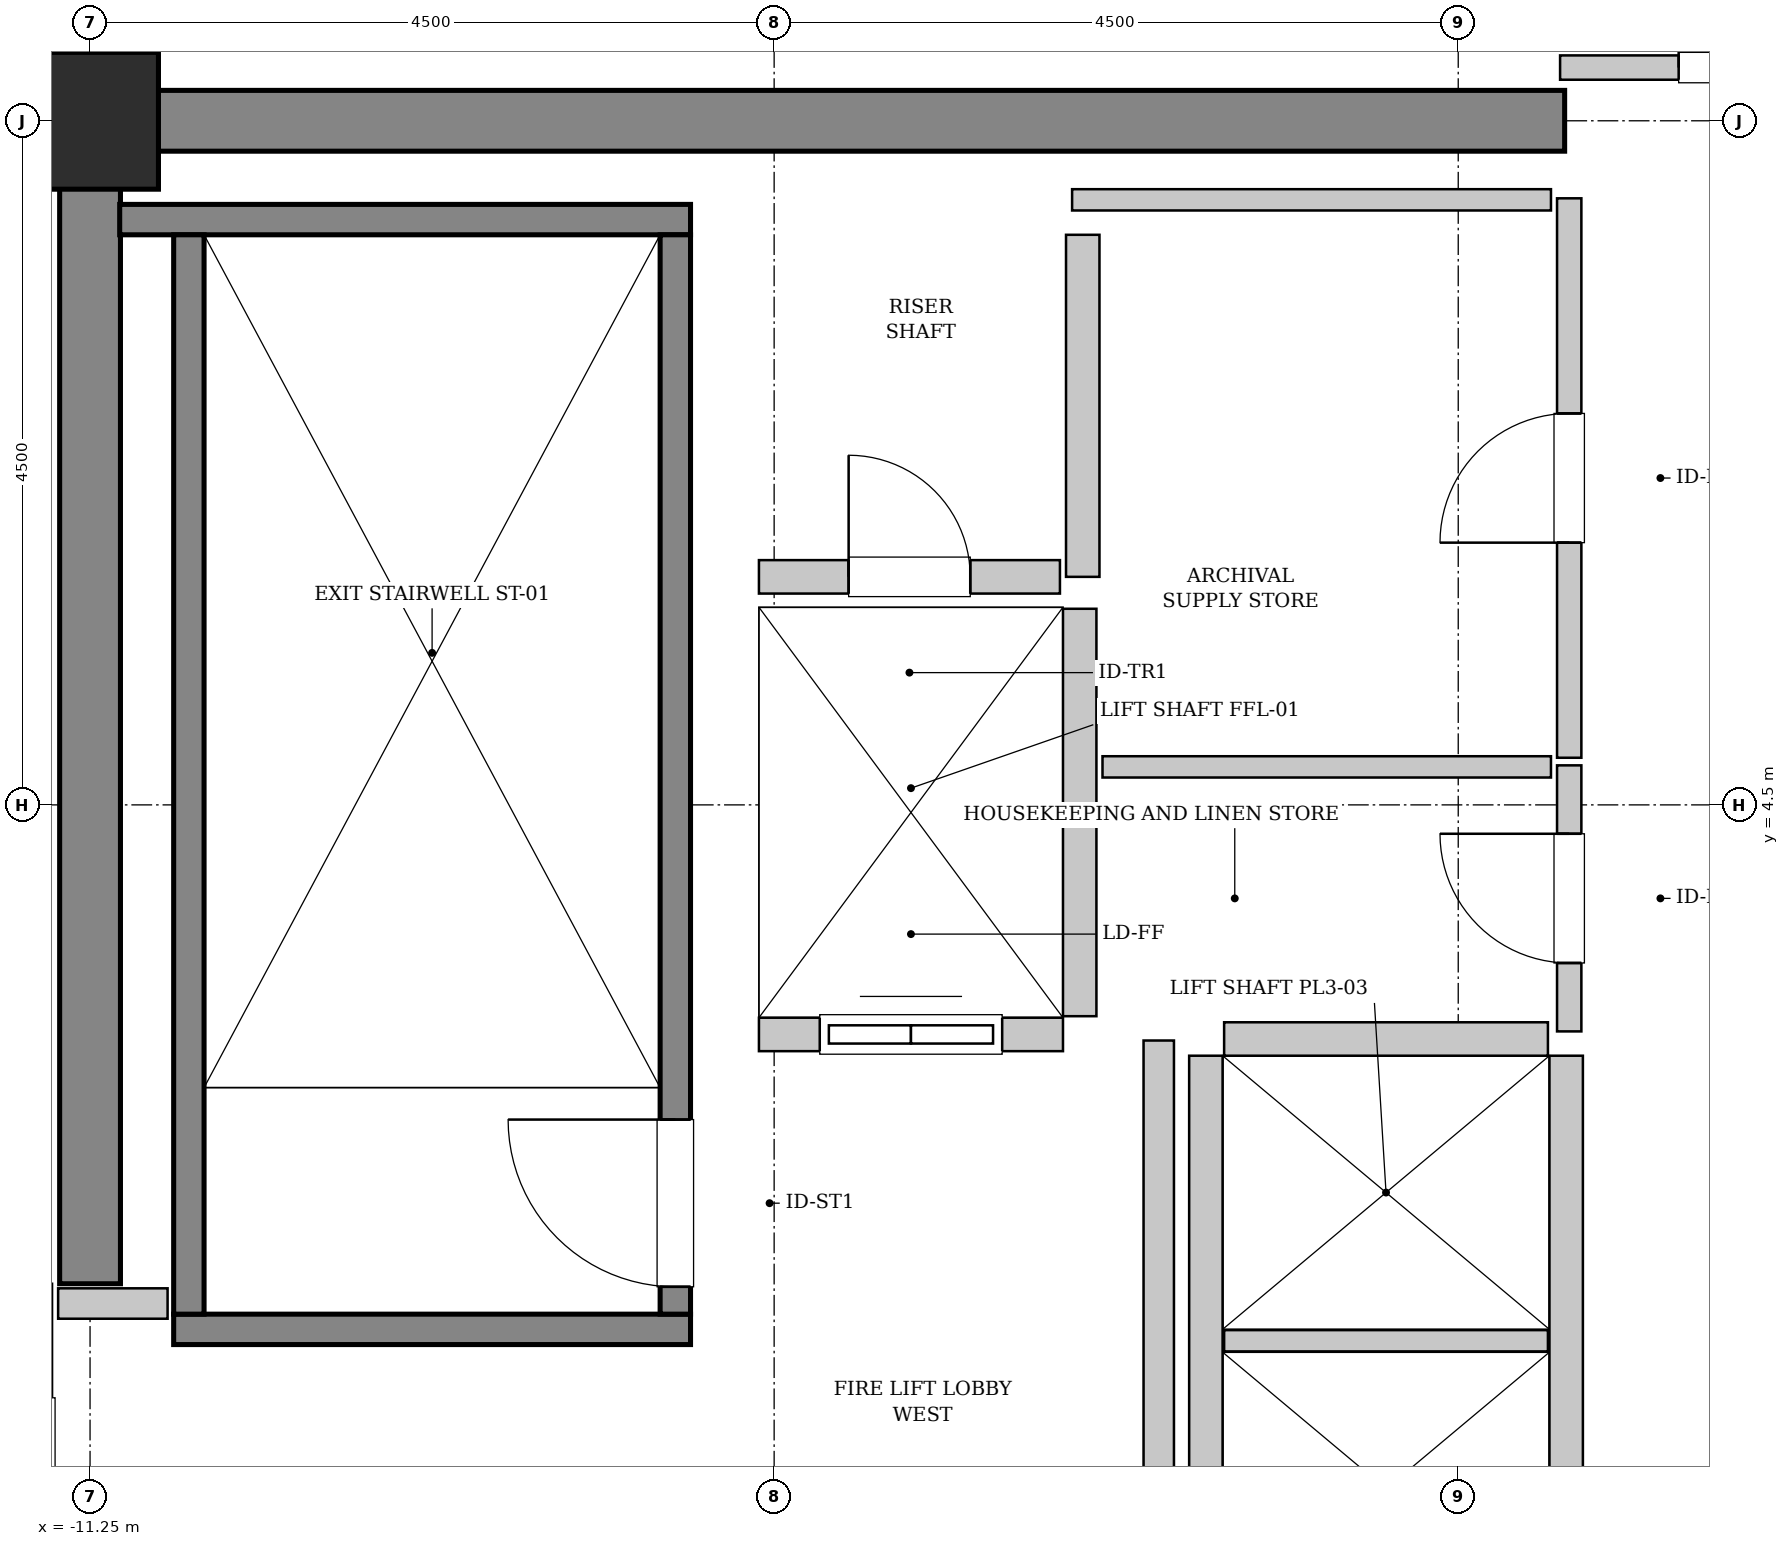
"""IFC4 building model, lengths in metres.
Left out: names, types, materials, properties, quantities, classifications, styles, units other than length and angle.
Written with IfcOpenShell. Run it as: python <this file> out.ifc"""

import sys

from ifc_helpers import new_model, si_unit, direction, frame, frame_2d, origin, origin_2d, place, context, subcontext, project, spatial, rectangle, extrude, source, transform, mapped, element, fill, save


model = new_model("IFC4")
c1 = context("Model", 3, precision=1e-05, world=origin(), true_north=direction((0.0, 1.0)))
c2 = subcontext(c1, "Body", "Model", "MODEL_VIEW")
j1 = project(units=[si_unit("LENGTHUNIT", "METRE"), si_unit("PLANEANGLEUNIT", "RADIAN")], contexts=[c1])
p1 = place(None, origin())
s1 = spatial("IfcSite", under=j1, at=p1, CompositionType="ELEMENT")
p2 = place(p1, origin())
s2 = spatial("IfcBuilding", under=s1, at=p2, CompositionType="ELEMENT")
p3 = place(p2, frame((0.0, 0.0, 349.0)))
s3 = spatial("IfcBuildingStorey", under=s2, at=p3, CompositionType="ELEMENT", Elevation=349.0)
m1 = source(origin(), c2, "Body", "SweptSolid", [
    extrude(rectangle(XDim=9.9, YDim=0.4, at=frame_2d((4.95, 0.0))), origin(), (0.0, 0.0, 1.0), 4.8),
])
p4 = place(p3, frame((-11.45, 9.0, 0.0), z_axis=(0.0, 0.0, 1.0), x_axis=(1.0, 0.0, 0.0)))
e1 = element("IfcWall", 1, at=p4, inside=s3, PredefinedType="SHEAR", context=c2, shape_type="MappedRepresentation", body=[
    mapped(m1, transform((0.0, 0.0, 0.0), x_axis=(1.0, 0.0, 0.0), y_axis=(0.0, 1.0, 0.0), z_axis=(0.0, 0.0, 1.0), scale=1.0)),
])
m2 = source(origin(), c2, "Body", "SweptSolid", [
    extrude(rectangle(XDim=7.45, YDim=0.4, at=frame_2d((3.725, 0.0))), origin(), (0.0, 0.0, 1.0), 4.8),
])
p5 = place(p3, frame((-11.25, 1.35, 0.0), z_axis=(0.0, 0.0, 1.0), x_axis=(0.0, 1.0, 0.0)))
e2 = element("IfcWall", 2, at=p5, inside=s3, PredefinedType="SHEAR", context=c2, shape_type="MappedRepresentation", body=[
    mapped(m2, transform((0.0, 0.0, 0.0), x_axis=(1.0, 0.0, 0.0), y_axis=(0.0, 1.0, 0.0), z_axis=(0.0, 0.0, 1.0), scale=1.0)),
])
m3 = source(origin(), c2, "Body", "SweptSolid", [
    extrude(rectangle(XDim=0.9, YDim=0.9, at=origin_2d()), origin(), (0.0, 0.0, 1.0), 4.8),
])
p6 = place(p3, frame((-11.25, 9.0, 0.0), z_axis=(0.0, 0.0, 1.0), x_axis=(1.0, 0.0, 0.0)))
e3 = element("IfcColumn", 3, at=p6, inside=s3, PredefinedType="COLUMN", context=c2, shape_type="MappedRepresentation", body=[
    mapped(m3, transform((0.0, 0.0, 0.0), x_axis=(1.0, 0.0, 0.0), y_axis=(0.0, 1.0, 0.0), z_axis=(0.0, 0.0, 1.0), scale=1.0)),
])
m4 = source(origin(), c2, "Body", "SweptSolid", [
    extrude(rectangle(XDim=3.4, YDim=0.2, at=frame_2d((1.7, 0.0))), origin(), (0.0, 0.0, 1.0), 4.8),
])
p7 = place(p3, frame((-7.3, 1.05, 0.0), z_axis=(0.0, 0.0, 1.0), x_axis=(-1.0, 0.0, 0.0)))
e4 = element("IfcWall", 4, at=p7, inside=s3, PredefinedType="SOLIDWALL", context=c2, shape_type="MappedRepresentation", body=[
    mapped(m4, transform((0.0, 0.0, 0.0), x_axis=(1.0, 0.0, 0.0), y_axis=(0.0, 1.0, 0.0), z_axis=(0.0, 0.0, 1.0), scale=1.0)),
])
m5 = source(origin(), c2, "Body", "SweptSolid", [
    extrude(rectangle(XDim=3.755, YDim=0.2, at=frame_2d((1.877, 0.0))), origin(), (0.0, 0.0, 1.0), 4.8),
])
p8 = place(p3, frame((-7.3, 8.35, 0.0), z_axis=(0.0, 0.0, 1.0), x_axis=(-1.0, 0.0, 0.0)))
e5 = element("IfcWall", 5, at=p8, inside=s3, PredefinedType="SOLIDWALL", context=c2, shape_type="MappedRepresentation", body=[
    mapped(m5, transform((0.0, 0.0, 0.0), x_axis=(1.0, 0.0, 0.0), y_axis=(0.0, 1.0, 0.0), z_axis=(0.0, 0.0, 1.0), scale=1.0)),
])
m6 = source(origin(), c2, "Body", "SweptSolid", [
    extrude(rectangle(XDim=7.1, YDim=0.2, at=frame_2d((3.55, 0.0))), origin(), (0.0, 0.0, 1.0), 4.8),
])
p9 = place(p3, frame((-7.4, 1.15, 0.0), z_axis=(0.0, 0.0, 1.0), x_axis=(0.0, 1.0, 0.0)))
e6 = element("IfcWall", 6, at=p9, inside=s3, PredefinedType="SOLIDWALL", context=c2, shape_type="MappedRepresentation", body=[
    mapped(m6, transform((0.0, 0.0, 0.0), x_axis=(1.0, 0.0, 0.0), y_axis=(0.0, 1.0, 0.0), z_axis=(0.0, 0.0, 1.0), scale=1.0)),
])
p10 = place(p9, frame((0.18, 0.0, 0.0)))
e7 = element("IfcOpeningElement", 7, at=p10, cuts=e6, PredefinedType="OPENING", context=c2, shape_type="SweptSolid", body=[
    extrude(rectangle(XDim=1.1, YDim=2.15, at=frame_2d((0.55, 1.075))), frame((0.0, 0.11, 0.0), z_axis=(0.0, -1.0, 0.0), x_axis=(1.0, 0.0, 0.0)), (0.0, 0.0, 1.0), 0.22),
])
p11 = place(p3, frame((-10.6, 1.15, 0.0), z_axis=(0.0, 0.0, 1.0), x_axis=(0.0, 1.0, 0.0)))
e8 = element("IfcWall", 8, at=p11, inside=s3, PredefinedType="SOLIDWALL", context=c2, shape_type="MappedRepresentation", body=[
    mapped(m6, transform((0.0, 0.0, 0.0), x_axis=(1.0, 0.0, 0.0), y_axis=(0.0, 1.0, 0.0), z_axis=(0.0, 0.0, 1.0), scale=1.0)),
])
m7 = source(origin(), c2, "Body", "SweptSolid", [
    extrude(rectangle(XDim=2.0, YDim=0.22, at=frame_2d((1.0, 0.0))), origin(), (0.0, 0.0, 1.0), 4.485),
])
p12 = place(p3, frame((-6.85, 2.99, 0.0), z_axis=(0.0, 0.0, 1.0), x_axis=(1.0, 0.0, 0.0)))
e9 = element("IfcWall", 9, at=p12, inside=s3, PredefinedType="SOLIDWALL", context=c2, shape_type="MappedRepresentation", body=[
    mapped(m7, transform((0.0, 0.0, 0.0), x_axis=(1.0, 0.0, 0.0), y_axis=(0.0, 1.0, 0.0), z_axis=(0.0, 0.0, 1.0), scale=1.0)),
])
p13 = place(p12, frame((0.4, 0.0, 0.0)))
e10 = element("IfcOpeningElement", 10, at=p13, cuts=e9, PredefinedType="OPENING", context=c2, shape_type="SweptSolid", body=[
    extrude(rectangle(XDim=1.2, YDim=2.2, at=frame_2d((0.6, 1.1))), frame((0.0, 0.12, 0.0), z_axis=(0.0, -1.0, 0.0), x_axis=(1.0, 0.0, 0.0)), (0.0, 0.0, 1.0), 0.24),
])
m8 = source(origin(), c2, "Body", "SweptSolid", [
    extrude(rectangle(XDim=2.68, YDim=0.22, at=frame_2d((1.34, 0.0))), origin(), (0.0, 0.0, 1.0), 4.485),
])
p14 = place(p3, frame((-4.74, 3.11, 0.0), z_axis=(0.0, 0.0, 1.0), x_axis=(0.0, 1.0, 0.0)))
e11 = element("IfcWall", 11, at=p14, inside=s3, PredefinedType="SOLIDWALL", context=c2, shape_type="MappedRepresentation", body=[
    mapped(m8, transform((0.0, 0.0, 0.0), x_axis=(1.0, 0.0, 0.0), y_axis=(0.0, 1.0, 0.0), z_axis=(0.0, 0.0, 1.0), scale=1.0)),
])
m9 = source(origin(), c2, "Body", "SweptSolid", [
    extrude(rectangle(XDim=5.7, YDim=0.22, at=frame_2d((2.85, 0.0))), origin(), (0.0, 0.0, 1.0), 4.485),
])
for number, where, z_axis, x_axis in (
    (12, (-1.54, -2.85, 0.0), (0.0, 0.0, 1.0), (0.0, 1.0, 0.0)),
    (13, (-3.91, 2.85, 0.0), (0.0, 0.0, 1.0), (0.0, -1.0, 0.0)),
):
    element("IfcWall", number, at=place(p3, frame(where, z_axis=z_axis, x_axis=x_axis)), inside=s3, PredefinedType="SOLIDWALL", context=c2, shape_type="MappedRepresentation", body=[
        mapped(m9, transform((0.0, 0.0, 0.0), x_axis=(1.0, 0.0, 0.0), y_axis=(0.0, 1.0, 0.0), z_axis=(0.0, 0.0, 1.0), scale=1.0)),
    ])
m10 = source(origin(), c2, "Body", "SweptSolid", [
    extrude(rectangle(XDim=2.13, YDim=0.14, at=frame_2d((1.065, 0.0))), origin(), (0.0, 0.0, 1.0), 4.485),
])
p15 = place(p3, frame((-3.79, 0.975, 0.0), z_axis=(0.0, 0.0, 1.0), x_axis=(1.0, 0.0, 0.0)))
e14 = element("IfcWall", 14, at=p15, inside=s3, PredefinedType="PARTITIONING", context=c2, shape_type="MappedRepresentation", body=[
    mapped(m10, transform((0.0, 0.0, 0.0), x_axis=(1.0, 0.0, 0.0), y_axis=(0.0, 1.0, 0.0), z_axis=(0.0, 0.0, 1.0), scale=1.0)),
])
m11 = source(origin(), c2, "Body", "SweptSolid", [
    extrude(rectangle(XDim=2.13, YDim=0.22, at=frame_2d((1.065, 0.0))), origin(), (0.0, 0.0, 1.0), 4.485),
])
p16 = place(p3, frame((-1.66, 2.96, 0.0), z_axis=(0.0, 0.0, 1.0), x_axis=(-1.0, 0.0, 0.0)))
e15 = element("IfcWall", 15, at=p16, inside=s3, PredefinedType="SOLIDWALL", context=c2, shape_type="MappedRepresentation", body=[
    mapped(m11, transform((0.0, 0.0, 0.0), x_axis=(1.0, 0.0, 0.0), y_axis=(0.0, 1.0, 0.0), z_axis=(0.0, 0.0, 1.0), scale=1.0)),
])
m12 = source(origin(), c2, "Body", "SweptSolid", [
    extrude(rectangle(XDim=2.25, YDim=0.22, at=frame_2d((1.125, 0.0))), origin(), (0.0, 0.0, 1.0), 4.485),
])
p17 = place(p3, frame((-4.72, 6.0, 0.0), z_axis=(0.0, 0.0, 1.0), x_axis=(0.0, 1.0, 0.0)))
e16 = element("IfcWall", 16, at=p17, inside=s3, PredefinedType="SOLIDWALL", context=c2, shape_type="MappedRepresentation", body=[
    mapped(m12, transform((0.0, 0.0, 0.0), x_axis=(1.0, 0.0, 0.0), y_axis=(0.0, 1.0, 0.0), z_axis=(0.0, 0.0, 1.0), scale=1.0)),
])
m13 = source(origin(), c2, "Body", "SweptSolid", [
    extrude(rectangle(XDim=1.98, YDim=0.22, at=frame_2d((0.99, 0.0))), origin(), (0.0, 0.0, 1.0), 4.485),
])
p18 = place(p3, frame((-6.85, 6.0, 0.0), z_axis=(0.0, 0.0, 1.0), x_axis=(1.0, 0.0, 0.0)))
e17 = element("IfcWall", 17, at=p18, inside=s3, PredefinedType="SOLIDWALL", context=c2, shape_type="MappedRepresentation", body=[
    mapped(m13, transform((0.0, 0.0, 0.0), x_axis=(1.0, 0.0, 0.0), y_axis=(0.0, 1.0, 0.0), z_axis=(0.0, 0.0, 1.0), scale=1.0)),
])
p19 = place(p18, frame((0.59, 0.0, 0.0)))
e18 = element("IfcOpeningElement", 18, at=p19, cuts=e17, PredefinedType="OPENING", context=c2, shape_type="SweptSolid", body=[
    extrude(rectangle(XDim=0.8, YDim=2.0, at=frame_2d((0.4, 1.0))), frame((0.0, 0.12, 0.0), z_axis=(0.0, -1.0, 0.0), x_axis=(1.0, 0.0, 0.0)), (0.0, 0.0, 1.0), 0.24),
])
m14 = source(origin(), c2, "Body", "SweptSolid", [
    extrude(rectangle(XDim=5.9, YDim=0.2, at=frame_2d((2.95, 0.0))), origin(), (0.0, 0.0, 1.0), 4.485),
])
p20 = place(p3, frame((-4.22, -2.95, 0.0), z_axis=(0.0, 0.0, 1.0), x_axis=(0.0, 1.0, 0.0)))
e19 = element("IfcWall", 19, at=p20, inside=s3, PredefinedType="PARTITIONING", context=c2, shape_type="MappedRepresentation", body=[
    mapped(m14, transform((0.0, 0.0, 0.0), x_axis=(1.0, 0.0, 0.0), y_axis=(0.0, 1.0, 0.0), z_axis=(0.0, 0.0, 1.0), scale=1.0)),
])
m15 = source(origin(), c2, "Body", "SweptSolid", [
    extrude(rectangle(XDim=0.72, YDim=0.2, at=frame_2d((0.36, 0.0))), origin(), (0.0, 0.0, 1.0), 4.485),
])
p21 = place(p3, frame((-11.46, 1.22, 0.0), z_axis=(0.0, 0.0, 1.0), x_axis=(1.0, 0.0, 0.0)))
e20 = element("IfcWall", 20, at=p21, inside=s3, PredefinedType="PARTITIONING", context=c2, shape_type="MappedRepresentation", body=[
    mapped(m15, transform((0.0, 0.0, 0.0), x_axis=(1.0, 0.0, 0.0), y_axis=(0.0, 1.0, 0.0), z_axis=(0.0, 0.0, 1.0), scale=1.0)),
])
m16 = source(origin(), c2, "Body", "SweptSolid", [
    extrude(rectangle(XDim=3.16, YDim=0.16, at=frame_2d((1.58, 0.0))), origin(), (0.0, 0.0, 1.0), 3.575),
])
p22 = place(p3, frame((-1.58, 9.35, 0.0), z_axis=(0.0, 0.0, 1.0), x_axis=(1.0, 0.0, 0.0)))
e21 = element("IfcWall", 21, at=p22, inside=s3, PredefinedType="PARTITIONING", context=c2, shape_type="MappedRepresentation", body=[
    mapped(m16, transform((0.0, 0.0, 0.0), x_axis=(1.0, 0.0, 0.0), y_axis=(0.0, 1.0, 0.0), z_axis=(0.0, 0.0, 1.0), scale=1.0)),
])
p23 = place(p22, frame((0.78, 0.0, 0.0)))
e22 = element("IfcOpeningElement", 22, at=p23, cuts=e21, PredefinedType="OPENING", context=c2, shape_type="SweptSolid", body=[
    extrude(rectangle(XDim=1.6, YDim=2.3, at=frame_2d((0.8, 1.15))), frame((0.0, 0.09, 0.0), z_axis=(0.0, -1.0, 0.0), x_axis=(1.0, 0.0, 0.0)), (0.0, 0.0, 1.0), 0.18),
])
m17 = source(origin(), c2, "Body", "SweptSolid", [
    extrude(rectangle(XDim=1.75, YDim=0.16, at=frame_2d((0.875, 0.0))), origin(), (0.0, 0.0, 1.0), 4.485),
])
p24 = place(p3, frame((-1.52, 3.01, 0.0), z_axis=(0.0, 0.0, 1.0), x_axis=(0.0, 1.0, 0.0)))
e23 = element("IfcWall", 23, at=p24, inside=s3, PredefinedType="PARTITIONING", context=c2, shape_type="MappedRepresentation", body=[
    mapped(m17, transform((0.0, 0.0, 0.0), x_axis=(1.0, 0.0, 0.0), y_axis=(0.0, 1.0, 0.0), z_axis=(0.0, 0.0, 1.0), scale=1.0)),
])
p25 = place(p24, frame((0.45, 0.0, 0.0)))
e24 = element("IfcOpeningElement", 24, at=p25, cuts=e23, PredefinedType="OPENING", context=c2, shape_type="SweptSolid", body=[
    extrude(rectangle(XDim=0.85, YDim=2.1, at=frame_2d((0.425, 1.05))), frame((0.0, 0.09, 0.0), z_axis=(0.0, -1.0, 0.0), x_axis=(1.0, 0.0, 0.0)), (0.0, 0.0, 1.0), 0.18),
])
m18 = source(origin(), c2, "Body", "SweptSolid", [
    extrude(rectangle(XDim=2.95, YDim=0.14, at=frame_2d((1.475, 0.0))), origin(), (0.0, 0.0, 1.0), 4.485),
])
p26 = place(p3, frame((-4.59, 4.75, 0.0), z_axis=(0.0, 0.0, 1.0), x_axis=(1.0, 0.0, 0.0)))
e25 = element("IfcWall", 25, at=p26, inside=s3, PredefinedType="PARTITIONING", context=c2, shape_type="MappedRepresentation", body=[
    mapped(m18, transform((0.0, 0.0, 0.0), x_axis=(1.0, 0.0, 0.0), y_axis=(0.0, 1.0, 0.0), z_axis=(0.0, 0.0, 1.0), scale=1.0)),
])
m19 = source(origin(), c2, "Body", "SweptSolid", [
    extrude(rectangle(XDim=3.68, YDim=0.16, at=frame_2d((1.84, 0.0))), origin(), (0.0, 0.0, 1.0), 4.485),
])
p27 = place(p3, frame((-1.52, 4.81, 0.0), z_axis=(0.0, 0.0, 1.0), x_axis=(0.0, 1.0, 0.0)))
e26 = element("IfcWall", 26, at=p27, inside=s3, PredefinedType="PARTITIONING", context=c2, shape_type="MappedRepresentation", body=[
    mapped(m19, transform((0.0, 0.0, 0.0), x_axis=(1.0, 0.0, 0.0), y_axis=(0.0, 1.0, 0.0), z_axis=(0.0, 0.0, 1.0), scale=1.0)),
])
p28 = place(p27, frame((1.415, 0.0, 0.0)))
e27 = element("IfcOpeningElement", 27, at=p28, cuts=e26, PredefinedType="OPENING", context=c2, shape_type="SweptSolid", body=[
    extrude(rectangle(XDim=0.85, YDim=2.1, at=frame_2d((0.425, 1.05))), frame((0.0, 0.09, 0.0), z_axis=(0.0, -1.0, 0.0), x_axis=(1.0, 0.0, 0.0)), (0.0, 0.0, 1.0), 0.18),
])
m20 = source(origin(), c2, "Body", "SweptSolid", [
    extrude(rectangle(XDim=3.15, YDim=0.14, at=frame_2d((1.575, 0.0))), origin(), (0.0, 0.0, 1.0), 4.485),
])
p29 = place(p3, frame((-4.79, 8.48, 0.0), z_axis=(0.0, 0.0, 1.0), x_axis=(1.0, 0.0, 0.0)))
e28 = element("IfcWall", 28, at=p29, inside=s3, PredefinedType="PARTITIONING", context=c2, shape_type="MappedRepresentation", body=[
    mapped(m20, transform((0.0, 0.0, 0.0), x_axis=(1.0, 0.0, 0.0), y_axis=(0.0, 1.0, 0.0), z_axis=(0.0, 0.0, 1.0), scale=1.0)),
])
m21 = source(origin(), c2, "Body", "SweptSolid", [
    extrude(rectangle(XDim=1.1, YDim=2.15, at=frame_2d((0.55, 1.075))), frame((0.0, 0.025, 0.0), z_axis=(0.0, -1.0, 0.0), x_axis=(1.0, 0.0, 0.0)), (0.0, 0.0, 1.0), 0.05),
])
p30 = place(p10, origin())
e29 = element("IfcDoor", 29, at=p30, inside=s3, OperationType="SINGLE_SWING_RIGHT", PredefinedType="DOOR", context=c2, shape_type="MappedRepresentation", body=[
    mapped(m21, transform((0.0, 0.0, 0.0), x_axis=(1.0, 0.0, 0.0), y_axis=(0.0, 1.0, 0.0), z_axis=(0.0, 0.0, 1.0), scale=1.0)),
])
fill(e7, e29)
m22 = source(origin(), c2, "Body", "SweptSolid", [
    extrude(rectangle(XDim=1.2, YDim=2.2, at=frame_2d((0.6, 1.1))), frame((0.0, 0.025, 0.0), z_axis=(0.0, -1.0, 0.0), x_axis=(1.0, 0.0, 0.0)), (0.0, 0.0, 1.0), 0.05),
])
p31 = place(p13, origin())
e30 = element("IfcDoor", 30, at=p31, inside=s3, OperationType="SLIDING_TO_LEFT", PredefinedType="DOOR", context=c2, shape_type="MappedRepresentation", body=[
    mapped(m22, transform((0.0, 0.0, 0.0), x_axis=(1.0, 0.0, 0.0), y_axis=(0.0, 1.0, 0.0), z_axis=(0.0, 0.0, 1.0), scale=1.0)),
])
fill(e10, e30)
m23 = source(origin(), c2, "Body", "SweptSolid", [
    extrude(rectangle(XDim=0.8, YDim=2.0, at=frame_2d((0.4, 1.0))), frame((0.0, 0.025, 0.0), z_axis=(0.0, -1.0, 0.0), x_axis=(1.0, 0.0, 0.0)), (0.0, 0.0, 1.0), 0.05),
])
p32 = place(p19, origin())
e31 = element("IfcDoor", 31, at=p32, inside=s3, OperationType="SINGLE_SWING_LEFT", PredefinedType="TRAPDOOR", context=c2, shape_type="MappedRepresentation", body=[
    mapped(m23, transform((0.0, 0.0, 0.0), x_axis=(1.0, 0.0, 0.0), y_axis=(0.0, 1.0, 0.0), z_axis=(0.0, 0.0, 1.0), scale=1.0)),
])
fill(e18, e31)
m24 = source(origin(), c2, "Body", "SweptSolid", [
    extrude(rectangle(XDim=1.6, YDim=2.3, at=frame_2d((0.8, 1.15))), frame((0.0, 0.025, 0.0), z_axis=(0.0, -1.0, 0.0), x_axis=(1.0, 0.0, 0.0)), (0.0, 0.0, 1.0), 0.05),
])
p33 = place(p23, origin())
e32 = element("IfcDoor", 32, at=p33, inside=s3, OperationType="DOUBLE_DOOR_SINGLE_SWING", PredefinedType="DOOR", context=c2, shape_type="MappedRepresentation", body=[
    mapped(m24, transform((0.0, 0.0, 0.0), x_axis=(1.0, 0.0, 0.0), y_axis=(0.0, 1.0, 0.0), z_axis=(0.0, 0.0, 1.0), scale=1.0)),
])
fill(e22, e32)
m25 = source(origin(), c2, "Body", "SweptSolid", [
    extrude(rectangle(XDim=0.85, YDim=2.1, at=frame_2d((0.425, 1.05))), frame((0.0, 0.025, 0.0), z_axis=(0.0, -1.0, 0.0), x_axis=(1.0, 0.0, 0.0)), (0.0, 0.0, 1.0), 0.05),
])
p34 = place(p25, origin())
e33 = element("IfcDoor", 33, at=p34, inside=s3, OperationType="SINGLE_SWING_RIGHT", PredefinedType="DOOR", context=c2, shape_type="MappedRepresentation", body=[
    mapped(m25, transform((0.0, 0.0, 0.0), x_axis=(1.0, 0.0, 0.0), y_axis=(0.0, 1.0, 0.0), z_axis=(0.0, 0.0, 1.0), scale=1.0)),
])
fill(e24, e33)
p35 = place(p28, origin())
e34 = element("IfcDoor", 34, at=p35, inside=s3, OperationType="SINGLE_SWING_LEFT", PredefinedType="DOOR", context=c2, shape_type="MappedRepresentation", body=[
    mapped(m25, transform((0.0, 0.0, 0.0), x_axis=(1.0, 0.0, 0.0), y_axis=(0.0, 1.0, 0.0), z_axis=(0.0, 0.0, 1.0), scale=1.0)),
])
fill(e27, e34)
save(model, sys.argv[1])
